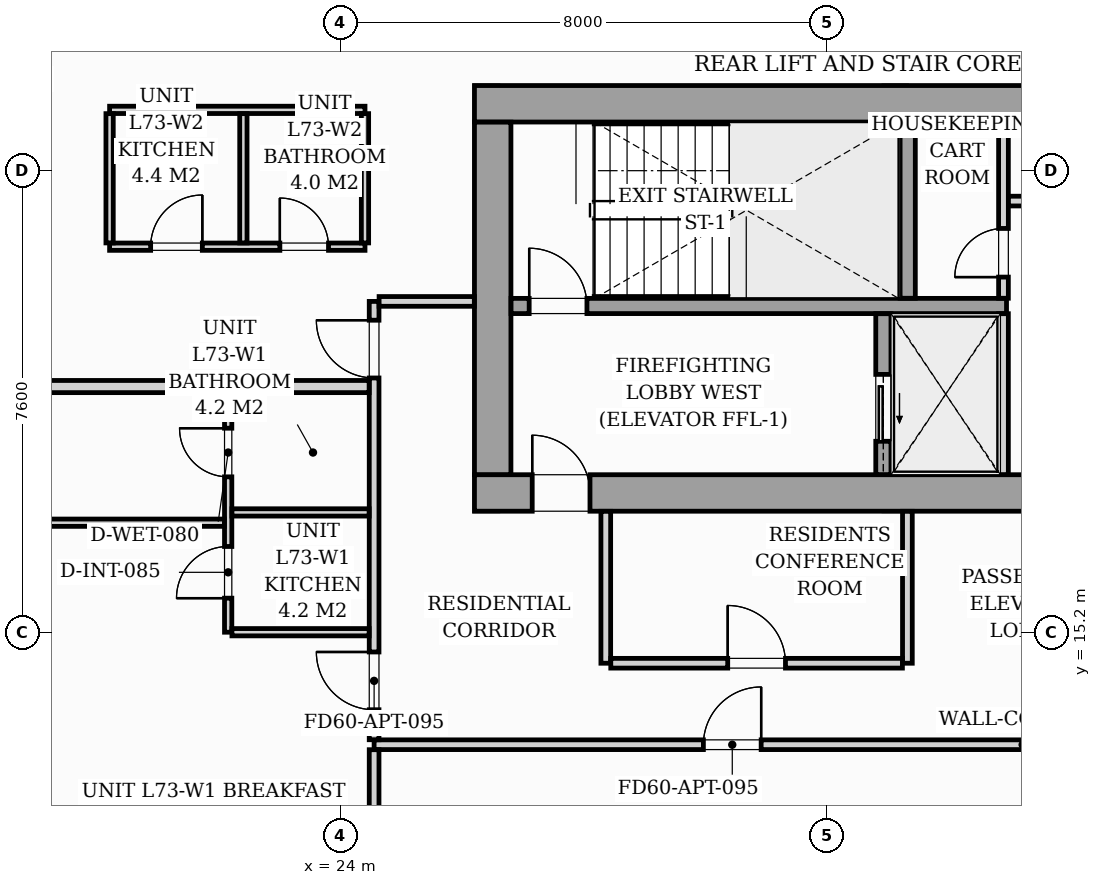
"""IFC4 building model, lengths in metres.
Left out: names, types, materials, properties, quantities, classifications, styles, units other than length and angle.
Written with IfcOpenShell. Run it as: python <this file> out.ifc"""

import sys

from ifc_helpers import new_model, si_unit, direction, frame, frame_2d, origin, origin_2d, place, context, subcontext, project, spatial, rectangle, i_section, extrude, source, transform, mapped, element, fill, save


model = new_model("IFC4")
c1 = context("Model", 3, precision=1e-05, world=origin(), true_north=direction((0.0, 1.0)))
c2 = subcontext(c1, "Body", "Model", "MODEL_VIEW")
j1 = project(units=[si_unit("LENGTHUNIT", "METRE"), si_unit("PLANEANGLEUNIT", "RADIAN")], contexts=[c1])
p1 = place(None, origin())
s1 = spatial("IfcSite", under=j1, at=p1, CompositionType="ELEMENT")
p2 = place(p1, origin())
s2 = spatial("IfcBuilding", under=s1, at=p2, CompositionType="ELEMENT")
p3 = place(p2, frame((0.0, 0.0, 252.9)))
s3 = spatial("IfcBuildingStorey", under=s2, at=p3, CompositionType="ELEMENT", Elevation=252.9)
m1 = source(origin(), c2, "Body", "SweptSolid", [
    extrude(i_section(OverallWidth=0.409, OverallDepth=0.425, WebThickness=0.033, FlangeThickness=0.052, FilletRadius=0.018, at=origin_2d()), origin(), (0.0, 0.0, 1.0), 3.296),
])
for number, where, z_axis, x_axis in (
    (1, (26.4, 17.4, 0.002), (0.0, 0.0, 1.0), (1.0, 0.0, 0.0)),
    (2, (33.12, 17.4, 0.002), (0.0, 0.0, 1.0), (1.0, 0.0, 0.0)),
    (3, (26.4, 24.0, 0.002), (0.0, 0.0, 1.0), (1.0, 0.0, 0.0)),
    (4, (33.12, 24.0, 0.002), (0.0, 0.0, 1.0), (1.0, 0.0, 0.0)),
):
    element("IfcColumn", number, at=place(p3, frame(where, z_axis=z_axis, x_axis=x_axis)), inside=s3, PredefinedType="PILASTER", context=c2, shape_type="MappedRepresentation", body=[
        mapped(m1, transform((0.0, 0.0, 0.0), scale=1.0)),
    ])
p4 = place(p3, frame((26.2, 17.5, 0.0), z_axis=(0.0, 0.0, 1.0), x_axis=(1.0, 0.0, 0.0)))
e5 = element("IfcWall", 5, at=p4, inside=s3, PredefinedType="SHEAR", context=c2, shape_type="SweptSolid", body=[
    extrude(rectangle(XDim=19.6, YDim=0.6, at=frame_2d((9.8, 0.0))), origin(), (0.0, 0.0, 1.0), 3.3),
])
p5 = place(p4, frame((0.95, 0.0, 0.0)))
e6 = element("IfcOpeningElement", 6, at=p5, cuts=e5, PredefinedType="OPENING", context=c2, shape_type="SweptSolid", body=[
    extrude(rectangle(XDim=0.95, YDim=2.06, at=frame_2d((0.475, 1.03))), frame((0.0, 0.31, 0.0), z_axis=(0.0, -1.0, 0.0), x_axis=(1.0, 0.0, 0.0)), (0.0, 0.0, 1.0), 0.62),
])
p6 = place(p4, frame((9.38, 0.0, 0.0)))
e7 = element("IfcOpeningElement", 7, at=p6, cuts=e5, PredefinedType="OPENING", context=c2, shape_type="SweptSolid", body=[
    extrude(rectangle(XDim=0.85, YDim=2.0, at=frame_2d((0.425, 1.0))), frame((0.0, 0.31, 0.0), z_axis=(0.0, -1.0, 0.0), x_axis=(1.0, 0.0, 0.0)), (0.0, 0.0, 1.0), 0.62),
])
p7 = place(p4, frame((17.55, 0.0, 0.0)))
e8 = element("IfcOpeningElement", 8, at=p7, cuts=e5, PredefinedType="OPENING", context=c2, shape_type="SweptSolid", body=[
    extrude(rectangle(XDim=0.95, YDim=2.06, at=frame_2d((0.475, 1.03))), frame((0.0, 0.31, 0.0), z_axis=(0.0, -1.0, 0.0), x_axis=(1.0, 0.0, 0.0)), (0.0, 0.0, 1.0), 0.62),
])
p8 = place(p3, frame((26.2, 23.9, 0.0), z_axis=(0.0, 0.0, 1.0), x_axis=(1.0, 0.0, 0.0)))
e9 = element("IfcWall", 9, at=p8, inside=s3, PredefinedType="SHEAR", context=c2, shape_type="SweptSolid", body=[
    extrude(rectangle(XDim=19.6, YDim=0.6, at=frame_2d((9.8, 0.0))), origin(), (0.0, 0.0, 1.0), 3.3),
])
p9 = place(p3, frame((26.5, 17.802, 0.0), z_axis=(0.0, 0.0, 1.0), x_axis=(0.0, 1.0, 0.0)))
e10 = element("IfcWall", 10, at=p9, inside=s3, PredefinedType="SHEAR", context=c2, shape_type="SweptSolid", body=[
    extrude(rectangle(XDim=5.796, YDim=0.6, at=frame_2d((2.898, 0.0))), origin(), (0.0, 0.0, 1.0), 3.3),
])
p10 = place(p3, frame((26.802, 20.575, 0.0), z_axis=(0.0, 0.0, 1.0), x_axis=(1.0, 0.0, 0.0)))
e11 = element("IfcWall", 11, at=p10, inside=s3, PredefinedType="SOLIDWALL", context=c2, shape_type="SweptSolid", body=[
    extrude(rectangle(XDim=8.148, YDim=0.25, at=frame_2d((4.074, 0.0))), origin(), (0.0, 0.0, 1.0), 3.3),
])
p11 = place(p10, frame((0.298, 0.0, 0.0)))
e12 = element("IfcOpeningElement", 12, at=p11, cuts=e11, PredefinedType="OPENING", context=c2, shape_type="SweptSolid", body=[
    extrude(rectangle(XDim=0.95, YDim=2.06, at=frame_2d((0.475, 1.03))), frame((0.0, 0.135, 0.0), z_axis=(0.0, -1.0, 0.0), x_axis=(1.0, 0.0, 0.0)), (0.0, 0.0, 1.0), 0.27),
])
p12 = place(p3, frame((33.325, 20.702, 0.0), z_axis=(0.0, 0.0, 1.0), x_axis=(0.0, 1.0, 0.0)))
e13 = element("IfcWall", 13, at=p12, inside=s3, PredefinedType="SOLIDWALL", context=c2, shape_type="SweptSolid", body=[
    extrude(rectangle(XDim=2.896, YDim=0.25, at=frame_2d((1.448, 0.0))), origin(), (0.0, 0.0, 1.0), 3.3),
])
p13 = place(p3, frame((32.925, 17.802, 0.0), z_axis=(0.0, 0.0, 1.0), x_axis=(0.0, 1.0, 0.0)))
e14 = element("IfcWall", 14, at=p13, inside=s3, PredefinedType="SOLIDWALL", context=c2, shape_type="SweptSolid", body=[
    extrude(rectangle(XDim=2.646, YDim=0.25, at=frame_2d((1.323, 0.0))), origin(), (0.0, 0.0, 1.0), 3.3),
])
p14 = place(p13, frame((0.548, 0.0, 0.0)))
e15 = element("IfcOpeningElement", 15, at=p14, cuts=e14, PredefinedType="OPENING", context=c2, shape_type="SweptSolid", body=[
    extrude(rectangle(XDim=1.1, YDim=2.08, at=frame_2d((0.55, 1.04))), frame((0.0, 0.135, 0.0), z_axis=(0.0, -1.0, 0.0), x_axis=(1.0, 0.0, 0.0)), (0.0, 0.0, 1.0), 0.27),
])
p15 = place(p3, frame((34.9, 17.802, 0.0), z_axis=(0.0, 0.0, 1.0), x_axis=(0.0, 1.0, 0.0)))
e16 = element("IfcWall", 16, at=p15, inside=s3, PredefinedType="PARTITIONING", context=c2, shape_type="SweptSolid", body=[
    extrude(rectangle(XDim=2.646, YDim=0.16, at=frame_2d((1.323, 0.0))), origin(), (0.0, 0.0, 1.0), 3.04),
])
p16 = place(p3, frame((34.9, 20.702, 0.0), z_axis=(0.0, 0.0, 1.0), x_axis=(0.0, 1.0, 0.0)))
e17 = element("IfcWall", 17, at=p16, inside=s3, PredefinedType="PARTITIONING", context=c2, shape_type="SweptSolid", body=[
    extrude(rectangle(XDim=2.896, YDim=0.16, at=frame_2d((1.448, 0.0))), origin(), (0.0, 0.0, 1.0), 3.04),
])
p17 = place(p16, frame((0.348, 0.0, 0.0)))
e18 = element("IfcOpeningElement", 18, at=p17, cuts=e17, PredefinedType="OPENING", context=c2, shape_type="SweptSolid", body=[
    extrude(rectangle(XDim=0.8, YDim=2.05, at=frame_2d((0.4, 1.025))), frame((0.0, 0.09, 0.0), z_axis=(0.0, -1.0, 0.0), x_axis=(1.0, 0.0, 0.0)), (0.0, 0.0, 1.0), 0.18),
])
p18 = place(p3, frame((34.982, 22.3, 0.0), z_axis=(0.0, 0.0, 1.0), x_axis=(1.0, 0.0, 0.0)))
e19 = element("IfcWall", 19, at=p18, inside=s3, PredefinedType="PARTITIONING", context=c2, shape_type="SweptSolid", body=[
    extrude(rectangle(XDim=3.566, YDim=0.16, at=frame_2d((1.783, 0.0))), origin(), (0.0, 0.0, 1.0), 3.04),
])
p19 = place(p18, frame((1.378, 0.0, 0.0)))
e20 = element("IfcOpeningElement", 20, at=p19, cuts=e19, PredefinedType="OPENING", context=c2, shape_type="SweptSolid", body=[
    extrude(rectangle(XDim=0.8, YDim=2.05, at=frame_2d((0.4, 1.025))), frame((0.0, 0.09, 0.0), z_axis=(0.0, -1.0, 0.0), x_axis=(1.0, 0.0, 0.0)), (0.0, 0.0, 1.0), 0.18),
])
p20 = place(p3, frame((24.55, 13.36, 0.0), z_axis=(0.0, 0.0, 1.0), x_axis=(1.0, 0.0, 0.0)))
e21 = element("IfcWall", 21, at=p20, inside=s3, PredefinedType="PARTITIONING", context=c2, shape_type="SweptSolid", body=[
    extrude(rectangle(XDim=21.33, YDim=0.16, at=frame_2d((10.665, 0.0))), origin(), (0.0, 0.0, 1.0), 2.605),
])
p21 = place(p20, frame((5.415, 0.0, 0.0)))
e22 = element("IfcOpeningElement", 22, at=p21, cuts=e21, PredefinedType="OPENING", context=c2, shape_type="SweptSolid", body=[
    extrude(rectangle(XDim=0.95, YDim=2.06, at=frame_2d((0.475, 1.03))), frame((0.0, 0.09, 0.0), z_axis=(0.0, -1.0, 0.0), x_axis=(1.0, 0.0, 0.0)), (0.0, 0.0, 1.0), 0.18),
])
p22 = place(p3, frame((24.55, 10.077, 0.0), z_axis=(0.0, 0.0, 1.0), x_axis=(0.0, 1.0, 0.0)))
e23 = element("IfcWall", 23, at=p22, inside=s3, PredefinedType="PARTITIONING", context=c2, shape_type="SweptSolid", body=[
    extrude(rectangle(XDim=3.201, YDim=0.16, at=frame_2d((1.601, 0.0))), origin(), (0.0, 0.0, 1.0), 3.04),
])
p23 = place(p3, frame((24.55, 13.442, 0.0), z_axis=(0.0, 0.0, 1.0), x_axis=(0.0, 1.0, 0.0)))
e24 = element("IfcWall", 24, at=p23, inside=s3, PredefinedType="PARTITIONING", context=c2, shape_type="SweptSolid", body=[
    extrude(rectangle(XDim=7.208, YDim=0.16, at=frame_2d((3.604, 0.0))), origin(), (0.0, 0.0, 1.0), 3.04),
])
p24 = place(p23, frame((0.493, 0.0, 0.0)))
e25 = element("IfcOpeningElement", 25, at=p24, cuts=e24, PredefinedType="OPENING", context=c2, shape_type="SweptSolid", body=[
    extrude(rectangle(XDim=0.95, YDim=2.06, at=frame_2d((0.475, 1.03))), frame((0.0, 0.09, 0.0), z_axis=(0.0, -1.0, 0.0), x_axis=(1.0, 0.0, 0.0)), (0.0, 0.0, 1.0), 0.18),
])
p25 = place(p23, frame((5.949, 0.0, 0.0)))
e26 = element("IfcOpeningElement", 26, at=p25, cuts=e24, PredefinedType="OPENING", context=c2, shape_type="SweptSolid", body=[
    extrude(rectangle(XDim=0.95, YDim=2.06, at=frame_2d((0.475, 1.03))), frame((0.0, 0.09, 0.0), z_axis=(0.0, -1.0, 0.0), x_axis=(1.0, 0.0, 0.0)), (0.0, 0.0, 1.0), 0.18),
])
p26 = place(p3, frame((24.632, 20.65, 0.0), z_axis=(0.0, 0.0, 1.0), x_axis=(1.0, 0.0, 0.0)))
e27 = element("IfcWall", 27, at=p26, inside=s3, PredefinedType="PARTITIONING", context=c2, shape_type="SweptSolid", body=[
    extrude(rectangle(XDim=1.566, YDim=0.16, at=frame_2d((0.783, 0.0))), origin(), (0.0, 0.0, 1.0), 3.04),
])
p27 = place(p3, frame((9.497, 19.25, 0.0), z_axis=(0.0, 0.0, 1.0), x_axis=(1.0, 0.0, 0.0)))
e28 = element("IfcWall", 28, at=p27, inside=s3, PredefinedType="PARTITIONING", context=c2, shape_type="SweptSolid", body=[
    extrude(rectangle(XDim=14.971, YDim=0.2, at=frame_2d((7.485, 0.0))), origin(), (0.0, 0.0, 1.0), 2.382),
])
p28 = place(p3, frame((22.15, 15.21, 0.0), z_axis=(0.0, 0.0, 1.0), x_axis=(0.0, 1.0, 0.0)))
e29 = element("IfcWall", 29, at=p28, inside=s3, PredefinedType="PARTITIONING", context=c2, shape_type="SweptSolid", body=[
    extrude(rectangle(XDim=3.938, YDim=0.12, at=frame_2d((1.969, 0.0))), origin(), (0.0, 0.0, 1.0), 3.04),
])
p29 = place(p28, frame((0.56, 0.0, 0.0)))
e30 = element("IfcOpeningElement", 30, at=p29, cuts=e29, PredefinedType="OPENING", context=c2, shape_type="SweptSolid", body=[
    extrude(rectangle(XDim=0.85, YDim=2.05, at=frame_2d((0.425, 1.025))), frame((0.0, 0.07, 0.0), z_axis=(0.0, -1.0, 0.0), x_axis=(1.0, 0.0, 0.0)), (0.0, 0.0, 1.0), 0.14),
])
p30 = place(p28, frame((2.555, 0.0, 0.0)))
e31 = element("IfcOpeningElement", 31, at=p30, cuts=e29, PredefinedType="OPENING", context=c2, shape_type="SweptSolid", body=[
    extrude(rectangle(XDim=0.8, YDim=2.02, at=frame_2d((0.4, 1.01))), frame((0.0, 0.07, 0.0), z_axis=(0.0, -1.0, 0.0), x_axis=(1.0, 0.0, 0.0)), (0.0, 0.0, 1.0), 0.14),
])
for number, where, z_axis, x_axis in (
    (32, (22.212, 17.18, 0.0), (0.0, 0.0, 1.0), (1.0, 0.0, 0.0)),
    (33, (22.212, 15.21, 0.0), (0.0, 0.0, 1.0), (1.0, 0.0, 0.0)),
):
    element("IfcWall", number, at=place(p3, frame(where, z_axis=z_axis, x_axis=x_axis)), inside=s3, PredefinedType="PARTITIONING", context=c2, shape_type="SweptSolid", body=[
        extrude(rectangle(XDim=2.256, YDim=0.12, at=frame_2d((1.128, 0.0))), origin(), (0.0, 0.0, 1.0), 3.04),
    ])
p31 = place(p3, frame((12.243, 17.011, 0.0), z_axis=(0.0, 0.0, 1.0), x_axis=(1.0, 0.0, 0.0)))
e34 = element("IfcWall", 34, at=p31, inside=s3, PredefinedType="PARTITIONING", context=c2, shape_type="SweptSolid", body=[
    extrude(rectangle(XDim=9.845, YDim=0.12, at=frame_2d((4.922, 0.0))), origin(), (0.0, 0.0, 1.0), 3.04),
])
p32 = place(p31, frame((4.497, 0.0, 0.0)))
e35 = element("IfcOpeningElement", 35, at=p32, cuts=e34, PredefinedType="OPENING", context=c2, shape_type="SweptSolid", body=[
    extrude(rectangle(XDim=0.85, YDim=2.05, at=frame_2d((0.425, 1.025))), frame((0.0, 0.07, 0.0), z_axis=(0.0, -1.0, 0.0), x_axis=(1.0, 0.0, 0.0)), (0.0, 0.0, 1.0), 0.14),
])
p33 = place(p3, frame((20.2, 21.55, 0.0), z_axis=(0.0, 0.0, 1.0), x_axis=(1.0, 0.0, 0.0)))
e36 = element("IfcWall", 36, at=p33, inside=s3, PredefinedType="PARTITIONING", context=c2, shape_type="SweptSolid", body=[
    extrude(rectangle(XDim=4.2, YDim=0.12, at=frame_2d((2.1, 0.0))), origin(), (0.0, 0.0, 1.0), 3.04),
])
p34 = place(p33, frame((0.675, 0.0, 0.0)))
e37 = element("IfcOpeningElement", 37, at=p34, cuts=e36, PredefinedType="OPENING", context=c2, shape_type="SweptSolid", body=[
    extrude(rectangle(XDim=0.85, YDim=2.05, at=frame_2d((0.425, 1.025))), frame((0.0, 0.07, 0.0), z_axis=(0.0, -1.0, 0.0), x_axis=(1.0, 0.0, 0.0)), (0.0, 0.0, 1.0), 0.14),
])
p35 = place(p33, frame((2.8, 0.0, 0.0)))
e38 = element("IfcOpeningElement", 38, at=p35, cuts=e36, PredefinedType="OPENING", context=c2, shape_type="SweptSolid", body=[
    extrude(rectangle(XDim=0.8, YDim=2.02, at=frame_2d((0.4, 1.01))), frame((0.0, 0.07, 0.0), z_axis=(0.0, -1.0, 0.0), x_axis=(1.0, 0.0, 0.0)), (0.0, 0.0, 1.0), 0.14),
])
p36 = place(p3, frame((20.2, 23.8, 0.0), z_axis=(0.0, 0.0, 1.0), x_axis=(1.0, 0.0, 0.0)))
e39 = element("IfcWall", 39, at=p36, inside=s3, PredefinedType="PARTITIONING", context=c2, shape_type="SweptSolid", body=[
    extrude(rectangle(XDim=4.2, YDim=0.12, at=frame_2d((2.1, 0.0))), origin(), (0.0, 0.0, 1.0), 3.04),
])
for number, where, z_axis, x_axis in (
    (40, (20.2, 21.612, 0.0), (0.0, 0.0, 1.0), (0.0, 1.0, 0.0)),
    (41, (22.4, 21.612, 0.0), (0.0, 0.0, 1.0), (0.0, 1.0, 0.0)),
    (42, (24.4, 21.612, 0.0), (0.0, 0.0, 1.0), (0.0, 1.0, 0.0)),
):
    element("IfcWall", number, at=place(p3, frame(where, z_axis=z_axis, x_axis=x_axis)), inside=s3, PredefinedType="PARTITIONING", context=c2, shape_type="SweptSolid", body=[
        extrude(rectangle(XDim=2.126, YDim=0.12, at=frame_2d((1.063, 0.0))), origin(), (0.0, 0.0, 1.0), 3.04),
    ])
for number, where, z_axis, x_axis in (
    (43, (28.36, 14.7, 0.0), (0.0, 0.0, 1.0), (0.0, 1.0, 0.0)),
    (44, (33.32, 14.7, 0.0), (0.0, 0.0, 1.0), (0.0, 1.0, 0.0)),
):
    element("IfcWall", number, at=place(p3, frame(where, z_axis=z_axis, x_axis=x_axis)), inside=s3, PredefinedType="PARTITIONING", context=c2, shape_type="SweptSolid", body=[
        extrude(rectangle(XDim=2.498, YDim=0.16, at=frame_2d((1.249, 0.0))), origin(), (0.0, 0.0, 1.0), 3.04),
    ])
p37 = place(p3, frame((28.442, 14.7, 0.0), z_axis=(0.0, 0.0, 1.0), x_axis=(1.0, 0.0, 0.0)))
e45 = element("IfcWall", 45, at=p37, inside=s3, PredefinedType="PARTITIONING", context=c2, shape_type="SweptSolid", body=[
    extrude(rectangle(XDim=4.796, YDim=0.16, at=frame_2d((2.398, 0.0))), origin(), (0.0, 0.0, 1.0), 2.605),
])
p38 = place(p37, frame((1.923, 0.0, 0.0)))
e46 = element("IfcOpeningElement", 46, at=p38, cuts=e45, PredefinedType="OPENING", context=c2, shape_type="SweptSolid", body=[
    extrude(rectangle(XDim=0.95, YDim=2.06, at=frame_2d((0.475, 1.03))), frame((0.0, 0.09, 0.0), z_axis=(0.0, -1.0, 0.0), x_axis=(1.0, 0.0, 0.0)), (0.0, 0.0, 1.0), 0.18),
])
m2 = source(origin(), c2, "Body", "SweptSolid", [
    extrude(rectangle(XDim=0.95, YDim=2.06, at=frame_2d((0.475, 1.03))), frame((0.0, 0.025, 0.0), z_axis=(0.0, -1.0, 0.0), x_axis=(1.0, 0.0, 0.0)), (0.0, 0.0, 1.0), 0.05),
])
p39 = place(p5, origin())
e47 = element("IfcDoor", 47, at=p39, inside=s3, OperationType="SINGLE_SWING_LEFT", PredefinedType="DOOR", context=c2, shape_type="MappedRepresentation", body=[
    mapped(m2, transform((0.0, 0.0, 0.0), scale=1.0)),
])
fill(e6, e47)
p40 = place(p11, origin())
e48 = element("IfcDoor", 48, at=p40, inside=s3, OperationType="SINGLE_SWING_LEFT", PredefinedType="DOOR", context=c2, shape_type="MappedRepresentation", body=[
    mapped(m2, transform((0.0, 0.0, 0.0), scale=1.0)),
])
fill(e12, e48)
m3 = source(origin(), c2, "Body", "SweptSolid", [
    extrude(rectangle(XDim=1.1, YDim=2.08, at=frame_2d((0.55, 1.04))), frame((0.0, 0.025, 0.0), z_axis=(0.0, -1.0, 0.0), x_axis=(1.0, 0.0, 0.0)), (0.0, 0.0, 1.0), 0.05),
])
p41 = place(p14, origin())
e49 = element("IfcDoor", 49, at=p41, inside=s3, OperationType="SLIDING_TO_LEFT", PredefinedType="DOOR", context=c2, shape_type="MappedRepresentation", body=[
    mapped(m3, transform((0.0, 0.0, 0.0), scale=1.0)),
])
fill(e15, e49)
m4 = source(origin(), c2, "Body", "SweptSolid", [
    extrude(rectangle(XDim=0.8, YDim=2.05, at=frame_2d((0.4, 1.025))), frame((0.0, 0.025, 0.0), z_axis=(0.0, -1.0, 0.0), x_axis=(1.0, 0.0, 0.0)), (0.0, 0.0, 1.0), 0.05),
])
p42 = place(p17, origin())
e50 = element("IfcDoor", 50, at=p42, inside=s3, OperationType="SINGLE_SWING_LEFT", PredefinedType="DOOR", context=c2, shape_type="MappedRepresentation", body=[
    mapped(m4, transform((0.0, 0.0, 0.0), scale=1.0)),
])
fill(e18, e50)
m5 = source(origin(), c2, "Body", "SweptSolid", [
    extrude(rectangle(XDim=0.95, YDim=2.06, at=frame_2d((0.475, 1.03))), frame((0.0, 0.025, 0.0), z_axis=(0.0, -1.0, 0.0), x_axis=(1.0, 0.0, 0.0)), (0.0, 0.0, 1.0), 0.05),
])
p43 = place(p21, origin())
e51 = element("IfcDoor", 51, at=p43, inside=s3, OperationType="SINGLE_SWING_RIGHT", PredefinedType="DOOR", context=c2, shape_type="MappedRepresentation", body=[
    mapped(m5, transform((0.0, 0.0, 0.0), scale=1.0)),
])
fill(e22, e51)
p44 = place(p24, origin())
e52 = element("IfcDoor", 52, at=p44, inside=s3, OperationType="SINGLE_SWING_RIGHT", PredefinedType="DOOR", context=c2, shape_type="MappedRepresentation", body=[
    mapped(m5, transform((0.0, 0.0, 0.0), scale=1.0)),
])
fill(e25, e52)
m6 = source(origin(), c2, "Body", "SweptSolid", [
    extrude(rectangle(XDim=0.85, YDim=2.05, at=frame_2d((0.425, 1.025))), frame((0.0, 0.025, 0.0), z_axis=(0.0, -1.0, 0.0), x_axis=(1.0, 0.0, 0.0)), (0.0, 0.0, 1.0), 0.05),
])
p45 = place(p29, origin())
e53 = element("IfcDoor", 53, at=p45, inside=s3, OperationType="SINGLE_SWING_LEFT", PredefinedType="DOOR", context=c2, shape_type="MappedRepresentation", body=[
    mapped(m6, transform((0.0, 0.0, 0.0), scale=1.0)),
])
fill(e30, e53)
m7 = source(origin(), c2, "Body", "SweptSolid", [
    extrude(rectangle(XDim=0.8, YDim=2.02, at=frame_2d((0.4, 1.01))), frame((0.0, 0.025, 0.0), z_axis=(0.0, -1.0, 0.0), x_axis=(1.0, 0.0, 0.0)), (0.0, 0.0, 1.0), 0.05),
])
p46 = place(p30, origin())
e54 = element("IfcDoor", 54, at=p46, inside=s3, OperationType="SINGLE_SWING_RIGHT", PredefinedType="DOOR", context=c2, shape_type="MappedRepresentation", body=[
    mapped(m7, transform((0.0, 0.0, 0.0), scale=1.0)),
])
fill(e31, e54)
p47 = place(p25, origin())
e55 = element("IfcDoor", 55, at=p47, inside=s3, OperationType="SINGLE_SWING_RIGHT", PredefinedType="DOOR", context=c2, shape_type="MappedRepresentation", body=[
    mapped(m5, transform((0.0, 0.0, 0.0), scale=1.0)),
])
fill(e26, e55)
p48 = place(p34, origin())
e56 = element("IfcDoor", 56, at=p48, inside=s3, OperationType="SINGLE_SWING_RIGHT", PredefinedType="DOOR", context=c2, shape_type="MappedRepresentation", body=[
    mapped(m6, transform((0.0, 0.0, 0.0), scale=1.0)),
])
fill(e37, e56)
p49 = place(p35, origin())
e57 = element("IfcDoor", 57, at=p49, inside=s3, OperationType="SINGLE_SWING_LEFT", PredefinedType="DOOR", context=c2, shape_type="MappedRepresentation", body=[
    mapped(m7, transform((0.0, 0.0, 0.0), scale=1.0)),
])
fill(e38, e57)
p50 = place(p38, origin())
e58 = element("IfcDoor", 58, at=p50, inside=s3, OperationType="SINGLE_SWING_LEFT", PredefinedType="DOOR", context=c2, shape_type="MappedRepresentation", body=[
    mapped(m5, transform((0.0, 0.0, 0.0), scale=1.0)),
])
fill(e46, e58)
save(model, sys.argv[1])
